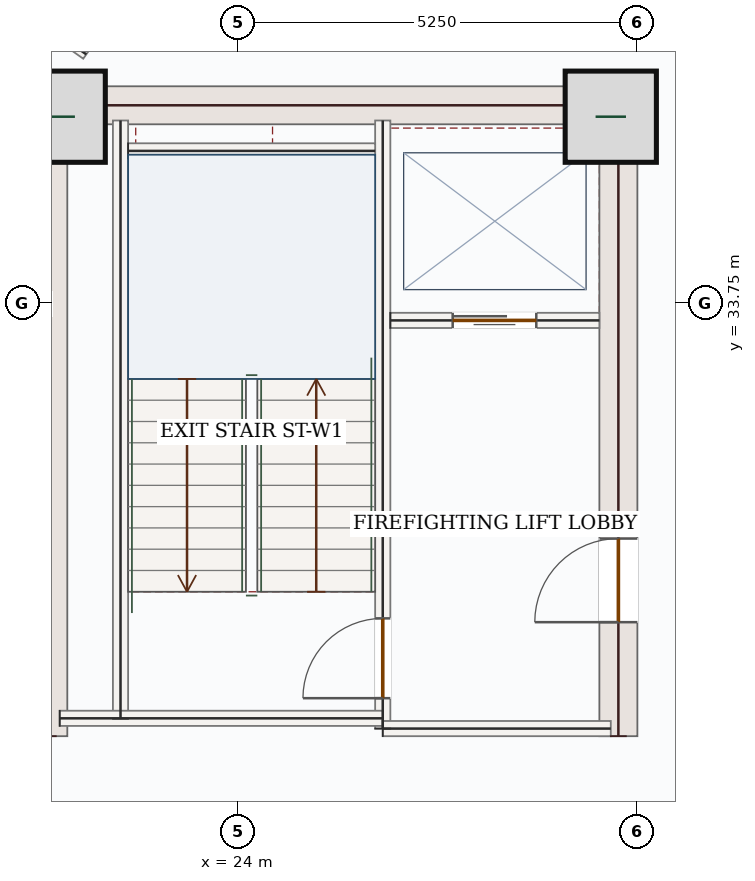
"""IFC4 building model, lengths in metres.
Left out: names, types, materials, properties, quantities, classifications, styles, units other than length and angle.
Written with IfcOpenShell. Run it as: python <this file> out.ifc"""

import sys

from ifc_helpers import new_model, si_unit, direction, frame, frame_2d, origin, origin_2d, place, context, subcontext, project, spatial, rectangle, extrude, source, transform, mapped, element, fill, save


model = new_model("IFC4")
c1 = context("Model", 3, precision=1e-05, world=origin(), true_north=direction((0.0, 1.0)))
c2 = subcontext(c1, "Body", "Model", "MODEL_VIEW")
j1 = project(units=[si_unit("LENGTHUNIT", "METRE"), si_unit("PLANEANGLEUNIT", "RADIAN")], contexts=[c1])
p1 = place(None, origin())
s1 = spatial("IfcSite", under=j1, at=p1, CompositionType="ELEMENT")
p2 = place(p1, origin())
s2 = spatial("IfcBuilding", under=s1, at=p2, CompositionType="ELEMENT")
p3 = place(p2, frame((0.0, 0.0, 139.5)))
s3 = spatial("IfcBuildingStorey", under=s2, at=p3, CompositionType="ELEMENT", Elevation=139.5)
m1 = source(origin(), c2, "Body", "SweptSolid", [
    extrude(rectangle(XDim=8.55, YDim=0.5, at=frame_2d((4.275, 0.0))), origin(), (0.0, 0.0, 1.0), 3.62),
])
p4 = place(p3, frame((21.5, 28.05, 0.0), z_axis=(0.0, 0.0, 1.0), x_axis=(0.0, 1.0, 0.0)))
e1 = element("IfcWall", 1, at=p4, inside=s3, PredefinedType="SHEAR", context=c2, shape_type="MappedRepresentation", body=[
    mapped(m1, transform((0.0, 0.0, 0.0), x_axis=(1.0, 0.0, 0.0), y_axis=(0.0, 1.0, 0.0), z_axis=(0.0, 0.0, 1.0), scale=1.0)),
])
p5 = place(p3, frame((29.0, 28.05, 0.0), z_axis=(0.0, 0.0, 1.0), x_axis=(0.0, 1.0, 0.0)))
e2 = element("IfcWall", 2, at=p5, inside=s3, PredefinedType="SHEAR", context=c2, shape_type="SweptSolid", body=[
    extrude(rectangle(XDim=8.55, YDim=0.5, at=frame_2d((4.275, 0.0))), origin(), (0.0, 0.0, 1.0), 3.62),
])
p6 = place(p5, frame((1.5, 0.0, 0.0)))
e3 = element("IfcOpeningElement", 3, at=p6, cuts=e2, PredefinedType="OPENING", context=c2, shape_type="SweptSolid", body=[
    extrude(rectangle(XDim=1.1, YDim=2.2, at=frame_2d((0.55, 1.1))), frame((0.0, 0.26, 0.0), z_axis=(0.0, -1.0, 0.0), x_axis=(1.0, 0.0, 0.0)), (0.0, 0.0, 1.0), 0.52),
])
m2 = source(origin(), c2, "Body", "SweptSolid", [
    extrude(rectangle(XDim=7.0, YDim=0.5, at=frame_2d((3.5, 0.0))), origin(), (0.0, 0.0, 1.0), 3.62),
])
p7 = place(p3, frame((21.75, 36.35, 0.0), z_axis=(0.0, 0.0, 1.0), x_axis=(1.0, 0.0, 0.0)))
e4 = element("IfcWall", 4, at=p7, inside=s3, PredefinedType="SHEAR", context=c2, shape_type="MappedRepresentation", body=[
    mapped(m2, transform((0.0, 0.0, 0.0), x_axis=(1.0, 0.0, 0.0), y_axis=(0.0, 1.0, 0.0), z_axis=(0.0, 0.0, 1.0), scale=1.0)),
])
m3 = source(origin(), c2, "Body", "SweptSolid", [
    extrude(rectangle(XDim=1.2, YDim=1.2, at=origin_2d()), origin(), (0.0, 0.0, 1.0), 3.9),
])
for number, where, z_axis, x_axis in (
    (5, (21.65, 36.2, 0.0), (0.0, 0.0, 1.0), (1.0, 0.0, 0.0)),
    (6, (28.9, 36.2, 0.0), (0.0, 0.0, 1.0), (1.0, 0.0, 0.0)),
):
    element("IfcColumn", number, at=place(p3, frame(where, z_axis=z_axis, x_axis=x_axis)), inside=s3, PredefinedType="COLUMN", context=c2, shape_type="MappedRepresentation", body=[
        mapped(m3, transform((0.0, 0.0, 0.0), x_axis=(1.0, 0.0, 0.0), y_axis=(0.0, 1.0, 0.0), z_axis=(0.0, 0.0, 1.0), scale=1.0)),
    ])
m4 = source(origin(), c2, "Body", "SweptSolid", [
    extrude(rectangle(XDim=5.258, YDim=0.28, at=frame_2d((2.629, 0.0))), origin(), (0.0, 0.0, 1.0), 3.62),
])
p8 = place(p3, frame((18.94, 35.542, 0.0), z_axis=(0.0, 0.0, 1.0), x_axis=(0.707106781187, 0.707106781187, 0.0)))
e7 = element("IfcWall", 7, at=p8, inside=s3, PredefinedType="SOLIDWALL", context=c2, shape_type="MappedRepresentation", body=[
    mapped(m4, transform((0.0, 0.0, 0.0), x_axis=(1.0, 0.0, 0.0), y_axis=(0.0, 1.0, 0.0), z_axis=(0.0, 0.0, 1.0), scale=1.0)),
])
m5 = source(origin(), c2, "Body", "SweptSolid", [
    extrude(rectangle(XDim=7.87, YDim=0.2, at=frame_2d((3.935, 0.0))), origin(), (0.0, 0.0, 1.0), 3.62),
])
p9 = place(p3, frame((22.45, 28.28, 0.0), z_axis=(0.0, 0.0, 1.0), x_axis=(0.0, 1.0, 0.0)))
e8 = element("IfcWall", 8, at=p9, inside=s3, PredefinedType="SOLIDWALL", context=c2, shape_type="MappedRepresentation", body=[
    mapped(m5, transform((0.0, 0.0, 0.0), x_axis=(1.0, 0.0, 0.0), y_axis=(0.0, 1.0, 0.0), z_axis=(0.0, 0.0, 1.0), scale=1.0)),
])
p10 = place(p3, frame((25.9, 28.15, 0.0), z_axis=(0.0, 0.0, 1.0), x_axis=(0.0, 1.0, 0.0)))
e9 = element("IfcWall", 9, at=p10, inside=s3, PredefinedType="SOLIDWALL", context=c2, shape_type="SweptSolid", body=[
    extrude(rectangle(XDim=8.0, YDim=0.2, at=frame_2d((4.0, 0.0))), origin(), (0.0, 0.0, 1.0), 3.62),
])
p11 = place(p10, frame((0.4, 0.0, 0.0)))
e10 = element("IfcOpeningElement", 10, at=p11, cuts=e9, PredefinedType="OPENING", context=c2, shape_type="SweptSolid", body=[
    extrude(rectangle(XDim=1.05, YDim=2.15, at=frame_2d((0.525, 1.075))), frame((0.0, 0.11, 0.0), z_axis=(0.0, -1.0, 0.0), x_axis=(1.0, 0.0, 0.0)), (0.0, 0.0, 1.0), 0.22),
])
m6 = source(origin(), c2, "Body", "SweptSolid", [
    extrude(rectangle(XDim=4.25, YDim=0.2, at=frame_2d((2.125, 0.0))), origin(), (0.0, 0.0, 1.0), 3.62),
])
p12 = place(p3, frame((21.65, 28.285, 0.0), z_axis=(0.0, 0.0, 1.0), x_axis=(1.0, 0.0, 0.0)))
e11 = element("IfcWall", 11, at=p12, inside=s3, PredefinedType="SOLIDWALL", context=c2, shape_type="MappedRepresentation", body=[
    mapped(m6, transform((0.0, 0.0, 0.0), x_axis=(1.0, 0.0, 0.0), y_axis=(0.0, 1.0, 0.0), z_axis=(0.0, 0.0, 1.0), scale=1.0)),
])
m7 = source(origin(), c2, "Body", "SweptSolid", [
    extrude(rectangle(XDim=3.0, YDim=0.2, at=frame_2d((1.5, 0.0))), origin(), (0.0, 0.0, 1.0), 3.62),
])
p13 = place(p3, frame((25.9, 28.15, 0.0), z_axis=(0.0, 0.0, 1.0), x_axis=(1.0, 0.0, 0.0)))
e12 = element("IfcWall", 12, at=p13, inside=s3, PredefinedType="SOLIDWALL", context=c2, shape_type="MappedRepresentation", body=[
    mapped(m7, transform((0.0, 0.0, 0.0), x_axis=(1.0, 0.0, 0.0), y_axis=(0.0, 1.0, 0.0), z_axis=(0.0, 0.0, 1.0), scale=1.0)),
])
m8 = source(origin(), c2, "Body", "SweptSolid", [
    extrude(rectangle(XDim=3.25, YDim=0.2, at=frame_2d((1.625, 0.0))), origin(), (0.0, 0.0, 1.0), 3.62),
])
p14 = place(p3, frame((22.55, 35.75, 0.0), z_axis=(0.0, 0.0, 1.0), x_axis=(1.0, 0.0, 0.0)))
e13 = element("IfcWall", 13, at=p14, inside=s3, PredefinedType="SOLIDWALL", context=c2, shape_type="MappedRepresentation", body=[
    mapped(m8, transform((0.0, 0.0, 0.0), x_axis=(1.0, 0.0, 0.0), y_axis=(0.0, 1.0, 0.0), z_axis=(0.0, 0.0, 1.0), scale=1.0)),
])
p15 = place(p3, frame((26.0, 33.52, 0.0), z_axis=(0.0, 0.0, 1.0), x_axis=(1.0, 0.0, 0.0)))
e14 = element("IfcWall", 14, at=p15, inside=s3, PredefinedType="SOLIDWALL", context=c2, shape_type="SweptSolid", body=[
    extrude(rectangle(XDim=2.75, YDim=0.2, at=frame_2d((1.375, 0.0))), origin(), (0.0, 0.0, 1.0), 3.62),
])
p16 = place(p15, frame((0.82, 0.0, 0.0)))
e15 = element("IfcOpeningElement", 15, at=p16, cuts=e14, PredefinedType="OPENING", context=c2, shape_type="SweptSolid", body=[
    extrude(rectangle(XDim=1.1, YDim=2.15, at=frame_2d((0.55, 1.075))), frame((0.0, 0.11, 0.0), z_axis=(0.0, -1.0, 0.0), x_axis=(1.0, 0.0, 0.0)), (0.0, 0.0, 1.0), 0.22),
])
m9 = source(origin(), c2, "Body", "SweptSolid", [
    extrude(rectangle(XDim=0.988, YDim=0.14, at=frame_2d((0.494, 0.0))), origin(), (0.0, 0.0, 1.0), 3.62),
])
p17 = place(p3, frame((21.193, 37.59, 0.0), z_axis=(0.0, 0.0, 1.0), x_axis=(0.81652929337, -0.577304004029, 0.0)))
e16 = element("IfcWall", 16, at=p17, inside=s3, PredefinedType="PARTITIONING", context=c2, shape_type="MappedRepresentation", body=[
    mapped(m9, transform((0.0, 0.0, 0.0), x_axis=(1.0, 0.0, 0.0), y_axis=(0.0, 1.0, 0.0), z_axis=(0.0, 0.0, 1.0), scale=1.0)),
])
m10 = source(origin(), c2, "Body", "SweptSolid", [
    extrude(rectangle(XDim=1.05, YDim=2.15, at=frame_2d((0.525, 1.075))), frame((0.0, 0.025, 0.0), z_axis=(0.0, -1.0, 0.0), x_axis=(1.0, 0.0, 0.0)), (0.0, 0.0, 1.0), 0.05),
])
p18 = place(p11, origin())
e17 = element("IfcDoor", 17, at=p18, inside=s3, OperationType="SINGLE_SWING_LEFT", PredefinedType="DOOR", context=c2, shape_type="MappedRepresentation", body=[
    mapped(m10, transform((0.0, 0.0, 0.0), x_axis=(1.0, 0.0, 0.0), y_axis=(0.0, 1.0, 0.0), z_axis=(0.0, 0.0, 1.0), scale=1.0)),
])
fill(e10, e17)
m11 = source(origin(), c2, "Body", "SweptSolid", [
    extrude(rectangle(XDim=1.1, YDim=2.15, at=frame_2d((0.55, 1.075))), frame((0.0, 0.025, 0.0), z_axis=(0.0, -1.0, 0.0), x_axis=(1.0, 0.0, 0.0)), (0.0, 0.0, 1.0), 0.05),
])
p19 = place(p16, origin())
e18 = element("IfcDoor", 18, at=p19, inside=s3, OperationType="DOUBLE_DOOR_SLIDING", PredefinedType="DOOR", context=c2, shape_type="MappedRepresentation", body=[
    mapped(m11, transform((0.0, 0.0, 0.0), x_axis=(1.0, 0.0, 0.0), y_axis=(0.0, 1.0, 0.0), z_axis=(0.0, 0.0, 1.0), scale=1.0)),
])
fill(e15, e18)
m12 = source(origin(), c2, "Body", "SweptSolid", [
    extrude(rectangle(XDim=1.1, YDim=2.2, at=frame_2d((0.55, 1.1))), frame((0.0, 0.025, 0.0), z_axis=(0.0, -1.0, 0.0), x_axis=(1.0, 0.0, 0.0)), (0.0, 0.0, 1.0), 0.05),
])
p20 = place(p6, origin())
e19 = element("IfcDoor", 19, at=p20, inside=s3, OperationType="SINGLE_SWING_LEFT", PredefinedType="DOOR", context=c2, shape_type="MappedRepresentation", body=[
    mapped(m12, transform((0.0, 0.0, 0.0), x_axis=(1.0, 0.0, 0.0), y_axis=(0.0, 1.0, 0.0), z_axis=(0.0, 0.0, 1.0), scale=1.0)),
])
fill(e3, e19)
save(model, sys.argv[1])
